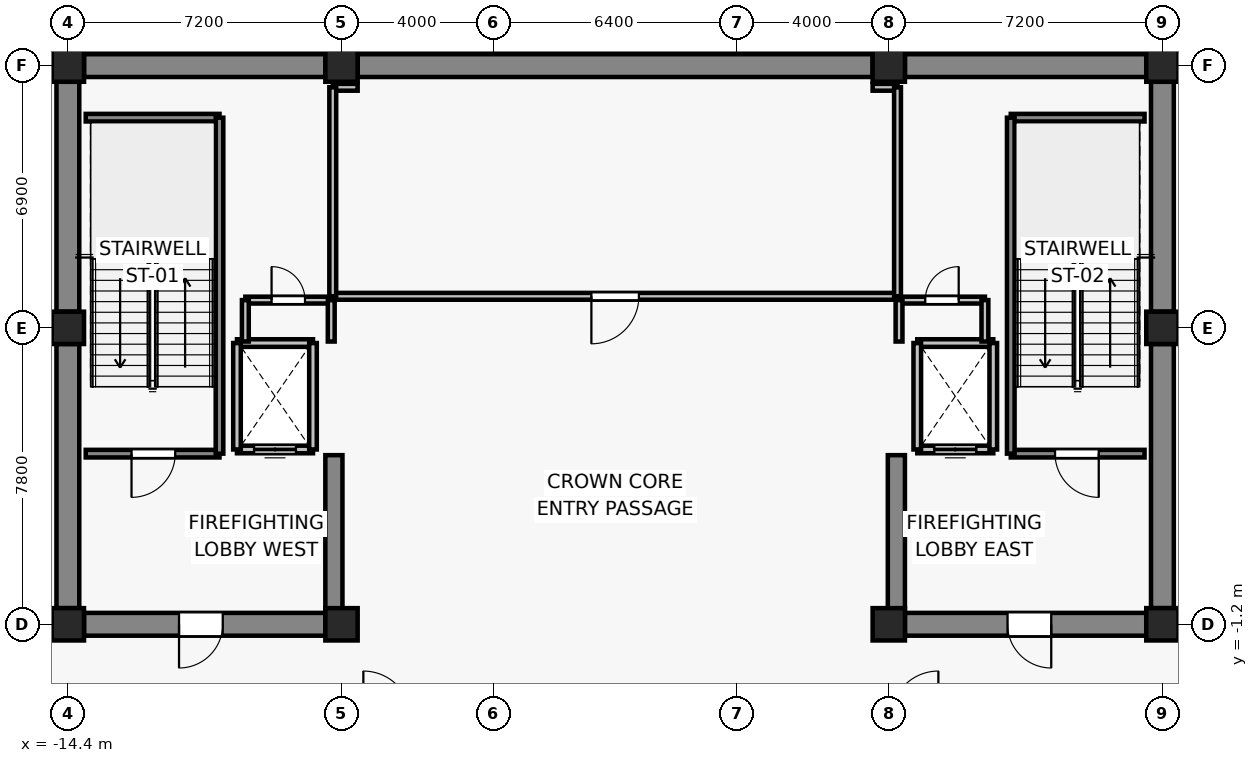
"""IFC4 building model, lengths in metres.
Left out: names, types, materials, properties, quantities, classifications, styles, units other than length and angle.
Written with IfcOpenShell. Run it as: python <this file> out.ifc"""

import sys

from ifc_helpers import new_model, si_unit, direction, frame, frame_2d, origin, origin_2d, place, context, subcontext, project, spatial, rectangle, extrude, source, transform, mapped, element, fill, save


model = new_model("IFC4")
c1 = context("Model", 3, precision=1e-05, world=origin(), true_north=direction((0.0, 1.0)))
c2 = subcontext(c1, "Body", "Model", "MODEL_VIEW")
j1 = project(units=[si_unit("LENGTHUNIT", "METRE"), si_unit("PLANEANGLEUNIT", "RADIAN")], contexts=[c1])
p1 = place(None, origin())
s1 = spatial("IfcSite", under=j1, at=p1, CompositionType="ELEMENT")
p2 = place(p1, origin())
s2 = spatial("IfcBuilding", under=s1, at=p2, CompositionType="ELEMENT")
p3 = place(p2, frame((0.0, 0.0, 285.4)))
s3 = spatial("IfcBuildingStorey", under=s2, at=p3, CompositionType="ELEMENT", Elevation=285.4)
for number, where, z_axis, x_axis in (
    (1, (-14.4, -1.2, 0.0), (0.0, 0.0, 1.0), (1.0, 0.0, 0.0)),
    (2, (-7.2, -1.2, 0.0), (0.0, 0.0, 1.0), (1.0, 0.0, 0.0)),
    (3, (7.2, -1.2, 0.0), (0.0, 0.0, 1.0), (1.0, 0.0, 0.0)),
    (4, (14.4, -1.2, 0.0), (0.0, 0.0, 1.0), (1.0, 0.0, 0.0)),
    (5, (-14.4, 6.6, 0.0), (0.0, 0.0, 1.0), (1.0, 0.0, 0.0)),
    (6, (14.4, 6.6, 0.0), (0.0, 0.0, 1.0), (1.0, 0.0, 0.0)),
    (7, (-14.4, 13.5, 0.0), (0.0, 0.0, 1.0), (1.0, 0.0, 0.0)),
    (8, (-7.2, 13.5, 0.0), (0.0, 0.0, 1.0), (1.0, 0.0, 0.0)),
    (9, (7.2, 13.5, 0.0), (0.0, 0.0, 1.0), (1.0, 0.0, 0.0)),
    (10, (14.4, 13.5, 0.0), (0.0, 0.0, 1.0), (1.0, 0.0, 0.0)),
):
    element("IfcColumn", number, at=place(p3, frame(where, z_axis=z_axis, x_axis=x_axis)), inside=s3, PredefinedType="COLUMN", context=c2, shape_type="SweptSolid", body=[
        extrude(rectangle(XDim=0.85, YDim=0.85, at=origin_2d()), origin(), (0.0, 0.0, 1.0), 4.6),
    ])
p4 = place(p3, frame((-13.975, 13.5, 0.0), z_axis=(0.0, 0.0, 1.0), x_axis=(1.0, 0.0, 0.0)))
e11 = element("IfcWall", 11, at=p4, inside=s3, PredefinedType="SHEAR", context=c2, shape_type="SweptSolid", body=[
    extrude(rectangle(XDim=6.35, YDim=0.6, at=frame_2d((3.175, 0.0))), origin(), (0.0, 0.0, 1.0), 4.38),
])
p5 = place(p3, frame((-6.775, 13.5, 0.0), z_axis=(0.0, 0.0, 1.0), x_axis=(1.0, 0.0, 0.0)))
e12 = element("IfcWall", 12, at=p5, inside=s3, PredefinedType="SHEAR", context=c2, shape_type="SweptSolid", body=[
    extrude(rectangle(XDim=13.55, YDim=0.6, at=frame_2d((6.775, 0.0))), origin(), (0.0, 0.0, 1.0), 4.38),
])
p6 = place(p3, frame((7.625, 13.5, 0.0), z_axis=(0.0, 0.0, 1.0), x_axis=(1.0, 0.0, 0.0)))
e13 = element("IfcWall", 13, at=p6, inside=s3, PredefinedType="SHEAR", context=c2, shape_type="SweptSolid", body=[
    extrude(rectangle(XDim=6.35, YDim=0.6, at=frame_2d((3.175, 0.0))), origin(), (0.0, 0.0, 1.0), 4.38),
])
p7 = place(p3, frame((-14.4, -0.775, 0.0), z_axis=(0.0, 0.0, 1.0), x_axis=(0.0, 1.0, 0.0)))
e14 = element("IfcWall", 14, at=p7, inside=s3, PredefinedType="SHEAR", context=c2, shape_type="SweptSolid", body=[
    extrude(rectangle(XDim=6.95, YDim=0.6, at=frame_2d((3.475, 0.0))), origin(), (0.0, 0.0, 1.0), 4.38),
])
p8 = place(p3, frame((-14.4, 7.025, 0.0), z_axis=(0.0, 0.0, 1.0), x_axis=(0.0, 1.0, 0.0)))
e15 = element("IfcWall", 15, at=p8, inside=s3, PredefinedType="SHEAR", context=c2, shape_type="SweptSolid", body=[
    extrude(rectangle(XDim=6.05, YDim=0.6, at=frame_2d((3.025, 0.0))), origin(), (0.0, 0.0, 1.0), 4.38),
])
p9 = place(p3, frame((14.4, -0.775, 0.0), z_axis=(0.0, 0.0, 1.0), x_axis=(0.0, 1.0, 0.0)))
e16 = element("IfcWall", 16, at=p9, inside=s3, PredefinedType="SHEAR", context=c2, shape_type="SweptSolid", body=[
    extrude(rectangle(XDim=6.95, YDim=0.6, at=frame_2d((3.475, 0.0))), origin(), (0.0, 0.0, 1.0), 4.38),
])
p10 = place(p3, frame((14.4, 7.025, 0.0), z_axis=(0.0, 0.0, 1.0), x_axis=(0.0, 1.0, 0.0)))
e17 = element("IfcWall", 17, at=p10, inside=s3, PredefinedType="SHEAR", context=c2, shape_type="SweptSolid", body=[
    extrude(rectangle(XDim=6.05, YDim=0.6, at=frame_2d((3.025, 0.0))), origin(), (0.0, 0.0, 1.0), 4.38),
])
p11 = place(p3, frame((-7.625, -1.2, 0.0), z_axis=(0.0, 0.0, 1.0), x_axis=(-1.0, 0.0, 0.0)))
e18 = element("IfcWall", 18, at=p11, inside=s3, PredefinedType="SHEAR", context=c2, shape_type="SweptSolid", body=[
    extrude(rectangle(XDim=6.35, YDim=0.6, at=frame_2d((3.175, 0.0))), origin(), (0.0, 0.0, 1.0), 4.38),
])
p12 = place(p11, frame((2.7, 0.0, 0.0)))
e19 = element("IfcOpeningElement", 19, at=p12, cuts=e18, PredefinedType="OPENING", context=c2, shape_type="SweptSolid", body=[
    extrude(rectangle(XDim=1.15, YDim=2.15, at=frame_2d((0.575, 1.075))), frame((0.0, 0.31, 0.0), z_axis=(0.0, -1.0, 0.0), x_axis=(1.0, 0.0, 0.0)), (0.0, 0.0, 1.0), 0.62),
])
p13 = place(p3, frame((13.975, -1.2, 0.0), z_axis=(0.0, 0.0, 1.0), x_axis=(-1.0, 0.0, 0.0)))
e20 = element("IfcWall", 20, at=p13, inside=s3, PredefinedType="SHEAR", context=c2, shape_type="SweptSolid", body=[
    extrude(rectangle(XDim=6.35, YDim=0.6, at=frame_2d((3.175, 0.0))), origin(), (0.0, 0.0, 1.0), 4.38),
])
p14 = place(p13, frame((2.5, 0.0, 0.0)))
e21 = element("IfcOpeningElement", 21, at=p14, cuts=e20, PredefinedType="OPENING", context=c2, shape_type="SweptSolid", body=[
    extrude(rectangle(XDim=1.15, YDim=2.15, at=frame_2d((0.575, 1.075))), frame((0.0, 0.31, 0.0), z_axis=(0.0, -1.0, 0.0), x_axis=(1.0, 0.0, 0.0)), (0.0, 0.0, 1.0), 0.62),
])
for number, where, z_axis, x_axis in (
    (22, (-7.4, -0.9, 0.0), (0.0, 0.0, 1.0), (0.0, 1.0, 0.0)),
    (23, (7.4, -0.9, 0.0), (0.0, 0.0, 1.0), (0.0, 1.0, 0.0)),
):
    element("IfcWall", number, at=place(p3, frame(where, z_axis=z_axis, x_axis=x_axis)), inside=s3, PredefinedType="SHEAR", context=c2, shape_type="SweptSolid", body=[
        extrude(rectangle(XDim=4.15, YDim=0.45, at=frame_2d((2.075, 0.0))), origin(), (0.0, 0.0, 1.0), 4.38),
    ])
p15 = place(p3, frame((-7.95, 3.4, 0.0), z_axis=(0.0, 0.0, 1.0), x_axis=(-1.0, 0.0, 0.0)))
e24 = element("IfcWall", 24, at=p15, inside=s3, PredefinedType="SOLIDWALL", context=c2, shape_type="SweptSolid", body=[
    extrude(rectangle(XDim=2.0, YDim=0.2, at=frame_2d((1.0, 0.0))), origin(), (0.0, 0.0, 1.0), 4.38),
])
p16 = place(p15, frame((0.45, 0.0, 0.0)))
e25 = element("IfcOpeningElement", 25, at=p16, cuts=e24, PredefinedType="OPENING", context=c2, shape_type="SweptSolid", body=[
    extrude(rectangle(XDim=1.1, YDim=2.2, at=frame_2d((0.55, 1.1))), frame((0.0, 0.11, 0.0), z_axis=(0.0, -1.0, 0.0), x_axis=(1.0, 0.0, 0.0)), (0.0, 0.0, 1.0), 0.22),
])
p17 = place(p3, frame((-9.95, 6.2, 0.0), z_axis=(0.0, 0.0, 1.0), x_axis=(1.0, 0.0, 0.0)))
e26 = element("IfcWall", 26, at=p17, inside=s3, PredefinedType="SOLIDWALL", context=c2, shape_type="SweptSolid", body=[
    extrude(rectangle(XDim=2.0, YDim=0.2, at=frame_2d((1.0, 0.0))), origin(), (0.0, 0.0, 1.0), 4.38),
])
for number, where, z_axis, x_axis in (
    (27, (-9.95, 3.4, 0.0), (0.0, 0.0, 1.0), (0.0, 1.0, 0.0)),
    (28, (-7.95, 6.2, 0.0), (0.0, 0.0, 1.0), (0.0, -1.0, 0.0)),
):
    element("IfcWall", number, at=place(p3, frame(where, z_axis=z_axis, x_axis=x_axis)), inside=s3, PredefinedType="SOLIDWALL", context=c2, shape_type="SweptSolid", body=[
        extrude(rectangle(XDim=2.8, YDim=0.2, at=frame_2d((1.4, 0.0))), origin(), (0.0, 0.0, 1.0), 4.38),
    ])
p18 = place(p3, frame((9.95, 3.4, 0.0), z_axis=(0.0, 0.0, 1.0), x_axis=(-1.0, 0.0, 0.0)))
e29 = element("IfcWall", 29, at=p18, inside=s3, PredefinedType="SOLIDWALL", context=c2, shape_type="SweptSolid", body=[
    extrude(rectangle(XDim=2.0, YDim=0.2, at=frame_2d((1.0, 0.0))), origin(), (0.0, 0.0, 1.0), 4.38),
])
p19 = place(p18, frame((0.45, 0.0, 0.0)))
e30 = element("IfcOpeningElement", 30, at=p19, cuts=e29, PredefinedType="OPENING", context=c2, shape_type="SweptSolid", body=[
    extrude(rectangle(XDim=1.1, YDim=2.2, at=frame_2d((0.55, 1.1))), frame((0.0, 0.11, 0.0), z_axis=(0.0, -1.0, 0.0), x_axis=(1.0, 0.0, 0.0)), (0.0, 0.0, 1.0), 0.22),
])
p20 = place(p3, frame((7.95, 6.2, 0.0), z_axis=(0.0, 0.0, 1.0), x_axis=(1.0, 0.0, 0.0)))
e31 = element("IfcWall", 31, at=p20, inside=s3, PredefinedType="SOLIDWALL", context=c2, shape_type="SweptSolid", body=[
    extrude(rectangle(XDim=2.0, YDim=0.2, at=frame_2d((1.0, 0.0))), origin(), (0.0, 0.0, 1.0), 4.38),
])
for number, where, z_axis, x_axis in (
    (32, (7.95, 3.4, 0.0), (0.0, 0.0, 1.0), (0.0, 1.0, 0.0)),
    (33, (9.95, 6.2, 0.0), (0.0, 0.0, 1.0), (0.0, -1.0, 0.0)),
):
    element("IfcWall", number, at=place(p3, frame(where, z_axis=z_axis, x_axis=x_axis)), inside=s3, PredefinedType="SOLIDWALL", context=c2, shape_type="SweptSolid", body=[
        extrude(rectangle(XDim=2.8, YDim=0.2, at=frame_2d((1.4, 0.0))), origin(), (0.0, 0.0, 1.0), 4.38),
    ])
p21 = place(p3, frame((-10.41, 3.29, 0.0), z_axis=(0.0, 0.0, 1.0), x_axis=(-1.0, 0.0, 0.0)))
e34 = element("IfcWall", 34, at=p21, inside=s3, PredefinedType="SOLIDWALL", context=c2, shape_type="SweptSolid", body=[
    extrude(rectangle(XDim=3.52, YDim=0.2, at=frame_2d((1.76, 0.0))), origin(), (0.0, 0.0, 1.0), 4.38),
])
p22 = place(p21, frame((1.165, 0.0, 0.0)))
e35 = element("IfcOpeningElement", 35, at=p22, cuts=e34, PredefinedType="OPENING", context=c2, shape_type="SweptSolid", body=[
    extrude(rectangle(XDim=1.15, YDim=2.15, at=frame_2d((0.575, 1.075))), frame((0.0, 0.11, 0.0), z_axis=(0.0, -1.0, 0.0), x_axis=(1.0, 0.0, 0.0)), (0.0, 0.0, 1.0), 0.22),
])
p23 = place(p3, frame((-13.93, 12.13, 0.0), z_axis=(0.0, 0.0, 1.0), x_axis=(1.0, 0.0, 0.0)))
e36 = element("IfcWall", 36, at=p23, inside=s3, PredefinedType="SOLIDWALL", context=c2, shape_type="SweptSolid", body=[
    extrude(rectangle(XDim=3.52, YDim=0.2, at=frame_2d((1.76, 0.0))), origin(), (0.0, 0.0, 1.0), 4.38),
])
p24 = place(p3, frame((-10.41, 12.13, 0.0), z_axis=(0.0, 0.0, 1.0), x_axis=(0.0, -1.0, 0.0)))
e37 = element("IfcWall", 37, at=p24, inside=s3, PredefinedType="SOLIDWALL", context=c2, shape_type="SweptSolid", body=[
    extrude(rectangle(XDim=8.84, YDim=0.2, at=frame_2d((4.42, 0.0))), origin(), (0.0, 0.0, 1.0), 4.38),
])
p25 = place(p3, frame((13.93, 3.29, 0.0), z_axis=(0.0, 0.0, 1.0), x_axis=(-1.0, 0.0, 0.0)))
e38 = element("IfcWall", 38, at=p25, inside=s3, PredefinedType="SOLIDWALL", context=c2, shape_type="SweptSolid", body=[
    extrude(rectangle(XDim=3.52, YDim=0.2, at=frame_2d((1.76, 0.0))), origin(), (0.0, 0.0, 1.0), 4.38),
])
p26 = place(p25, frame((1.205, 0.0, 0.0)))
e39 = element("IfcOpeningElement", 39, at=p26, cuts=e38, PredefinedType="OPENING", context=c2, shape_type="SweptSolid", body=[
    extrude(rectangle(XDim=1.15, YDim=2.15, at=frame_2d((0.575, 1.075))), frame((0.0, 0.11, 0.0), z_axis=(0.0, -1.0, 0.0), x_axis=(1.0, 0.0, 0.0)), (0.0, 0.0, 1.0), 0.22),
])
p27 = place(p3, frame((10.41, 12.13, 0.0), z_axis=(0.0, 0.0, 1.0), x_axis=(1.0, 0.0, 0.0)))
e40 = element("IfcWall", 40, at=p27, inside=s3, PredefinedType="SOLIDWALL", context=c2, shape_type="SweptSolid", body=[
    extrude(rectangle(XDim=3.52, YDim=0.2, at=frame_2d((1.76, 0.0))), origin(), (0.0, 0.0, 1.0), 4.38),
])
p28 = place(p3, frame((10.41, 3.29, 0.0), z_axis=(0.0, 0.0, 1.0), x_axis=(0.0, 1.0, 0.0)))
e41 = element("IfcWall", 41, at=p28, inside=s3, PredefinedType="SOLIDWALL", context=c2, shape_type="SweptSolid", body=[
    extrude(rectangle(XDim=8.84, YDim=0.2, at=frame_2d((4.42, 0.0))), origin(), (0.0, 0.0, 1.0), 4.38),
])
p29 = place(p3, frame((7.43, 7.43, 0.0), z_axis=(0.0, 0.0, 1.0), x_axis=(-1.0, 0.0, 0.0)))
e42 = element("IfcWall", 42, at=p29, inside=s3, PredefinedType="PARTITIONING", context=c2, shape_type="SweptSolid", body=[
    extrude(rectangle(XDim=14.86, YDim=0.18, at=frame_2d((7.43, 0.0))), origin(), (0.0, 0.0, 1.0), 3.77),
])
p30 = place(p29, frame((6.805, 0.0, 0.0)))
e43 = element("IfcOpeningElement", 43, at=p30, cuts=e42, PredefinedType="OPENING", context=c2, shape_type="SweptSolid", body=[
    extrude(rectangle(XDim=1.25, YDim=2.15, at=frame_2d((0.625, 1.075))), frame((0.0, 0.1, 0.0), z_axis=(0.0, -1.0, 0.0), x_axis=(1.0, 0.0, 0.0)), (0.0, 0.0, 1.0), 0.2),
])
for number, where, z_axis, x_axis in (
    (44, (-7.43, 12.93, 0.0), (0.0, 0.0, 1.0), (1.0, 0.0, 0.0)),
    (45, (6.775, 12.93, 0.0), (0.0, 0.0, 1.0), (1.0, 0.0, 0.0)),
):
    element("IfcWall", number, at=place(p3, frame(where, z_axis=z_axis, x_axis=x_axis)), inside=s3, PredefinedType="PARTITIONING", context=c2, shape_type="SweptSolid", body=[
        extrude(rectangle(XDim=0.655, YDim=0.18, at=frame_2d((0.328, 0.0))), origin(), (0.0, 0.0, 1.0), 3.77),
    ])
for number, where, z_axis, x_axis in (
    (46, (-7.43, 7.43, 0.0), (0.0, 0.0, 1.0), (0.0, 1.0, 0.0)),
    (47, (7.43, 12.93, 0.0), (0.0, 0.0, 1.0), (0.0, -1.0, 0.0)),
):
    element("IfcWall", number, at=place(p3, frame(where, z_axis=z_axis, x_axis=x_axis)), inside=s3, PredefinedType="PARTITIONING", context=c2, shape_type="SweptSolid", body=[
        extrude(rectangle(XDim=5.5, YDim=0.18, at=frame_2d((2.75, 0.0))), origin(), (0.0, 0.0, 1.0), 3.77),
    ])
p31 = place(p3, frame((-9.73, 7.33, 0.0), z_axis=(0.0, 0.0, 1.0), x_axis=(1.0, 0.0, 0.0)))
e48 = element("IfcWall", 48, at=p31, inside=s3, PredefinedType="PARTITIONING", context=c2, shape_type="SweptSolid", body=[
    extrude(rectangle(XDim=2.26, YDim=0.18, at=frame_2d((1.13, 0.0))), origin(), (0.0, 0.0, 1.0), 3.77),
])
p32 = place(p31, frame((0.69, 0.0, 0.0)))
e49 = element("IfcOpeningElement", 49, at=p32, cuts=e48, PredefinedType="OPENING", context=c2, shape_type="SweptSolid", body=[
    extrude(rectangle(XDim=0.88, YDim=2.1, at=frame_2d((0.44, 1.05))), frame((0.0, 0.1, 0.0), z_axis=(0.0, -1.0, 0.0), x_axis=(1.0, 0.0, 0.0)), (0.0, 0.0, 1.0), 0.2),
])
p33 = place(p3, frame((-9.73, 6.24, 0.0), z_axis=(0.0, 0.0, 1.0), x_axis=(0.0, 1.0, 0.0)))
e50 = element("IfcWall", 50, at=p33, inside=s3, PredefinedType="PARTITIONING", context=c2, shape_type="SweptSolid", body=[
    extrude(rectangle(XDim=1.09, YDim=0.18, at=frame_2d((0.545, 0.0))), origin(), (0.0, 0.0, 1.0), 4.38),
])
p34 = place(p3, frame((-7.47, 7.33, 0.0), z_axis=(0.0, 0.0, 1.0), x_axis=(0.0, -1.0, 0.0)))
e51 = element("IfcWall", 51, at=p34, inside=s3, PredefinedType="PARTITIONING", context=c2, shape_type="SweptSolid", body=[
    extrude(rectangle(XDim=1.09, YDim=0.18, at=frame_2d((0.545, 0.0))), origin(), (0.0, 0.0, 1.0), 3.77),
])
p35 = place(p3, frame((7.47, 7.33, 0.0), z_axis=(0.0, 0.0, 1.0), x_axis=(1.0, 0.0, 0.0)))
e52 = element("IfcWall", 52, at=p35, inside=s3, PredefinedType="PARTITIONING", context=c2, shape_type="SweptSolid", body=[
    extrude(rectangle(XDim=2.26, YDim=0.18, at=frame_2d((1.13, 0.0))), origin(), (0.0, 0.0, 1.0), 3.77),
])
p36 = place(p35, frame((0.69, 0.0, 0.0)))
e53 = element("IfcOpeningElement", 53, at=p36, cuts=e52, PredefinedType="OPENING", context=c2, shape_type="SweptSolid", body=[
    extrude(rectangle(XDim=0.88, YDim=2.1, at=frame_2d((0.44, 1.05))), frame((0.0, 0.1, 0.0), z_axis=(0.0, -1.0, 0.0), x_axis=(1.0, 0.0, 0.0)), (0.0, 0.0, 1.0), 0.2),
])
p37 = place(p3, frame((7.47, 6.24, 0.0), z_axis=(0.0, 0.0, 1.0), x_axis=(0.0, 1.0, 0.0)))
e54 = element("IfcWall", 54, at=p37, inside=s3, PredefinedType="PARTITIONING", context=c2, shape_type="SweptSolid", body=[
    extrude(rectangle(XDim=1.09, YDim=0.18, at=frame_2d((0.545, 0.0))), origin(), (0.0, 0.0, 1.0), 3.77),
])
p38 = place(p3, frame((9.73, 7.33, 0.0), z_axis=(0.0, 0.0, 1.0), x_axis=(0.0, -1.0, 0.0)))
e55 = element("IfcWall", 55, at=p38, inside=s3, PredefinedType="PARTITIONING", context=c2, shape_type="SweptSolid", body=[
    extrude(rectangle(XDim=1.09, YDim=0.18, at=frame_2d((0.545, 0.0))), origin(), (0.0, 0.0, 1.0), 4.38),
])
m1 = source(origin(), c2, "Body", "SweptSolid", [
    extrude(rectangle(XDim=1.1, YDim=2.2, at=frame_2d((0.55, 1.1))), frame((0.0, 0.025, 0.0), z_axis=(0.0, -1.0, 0.0), x_axis=(1.0, 0.0, 0.0)), (0.0, 0.0, 1.0), 0.05),
])
p39 = place(p16, origin())
e56 = element("IfcDoor", 56, at=p39, inside=s3, OperationType="DOUBLE_DOOR_SLIDING", PredefinedType="DOOR", context=c2, shape_type="MappedRepresentation", body=[
    mapped(m1, transform((0.0, 0.0, 0.0), x_axis=(1.0, 0.0, 0.0), y_axis=(0.0, 1.0, 0.0), z_axis=(0.0, 0.0, 1.0), scale=1.0)),
])
fill(e25, e56)
p40 = place(p19, origin())
e57 = element("IfcDoor", 57, at=p40, inside=s3, OperationType="DOUBLE_DOOR_SLIDING", PredefinedType="DOOR", context=c2, shape_type="MappedRepresentation", body=[
    mapped(m1, transform((0.0, 0.0, 0.0), x_axis=(1.0, 0.0, 0.0), y_axis=(0.0, 1.0, 0.0), z_axis=(0.0, 0.0, 1.0), scale=1.0)),
])
fill(e30, e57)
m2 = source(origin(), c2, "Body", "SweptSolid", [
    extrude(rectangle(XDim=1.15, YDim=2.15, at=frame_2d((0.575, 1.075))), frame((0.0, 0.025, 0.0), z_axis=(0.0, -1.0, 0.0), x_axis=(1.0, 0.0, 0.0)), (0.0, 0.0, 1.0), 0.05),
])
p41 = place(p22, origin())
e58 = element("IfcDoor", 58, at=p41, inside=s3, OperationType="SINGLE_SWING_RIGHT", PredefinedType="DOOR", context=c2, shape_type="MappedRepresentation", body=[
    mapped(m2, transform((0.0, 0.0, 0.0), x_axis=(1.0, 0.0, 0.0), y_axis=(0.0, 1.0, 0.0), z_axis=(0.0, 0.0, 1.0), scale=1.0)),
])
fill(e35, e58)
p42 = place(p26, origin())
e59 = element("IfcDoor", 59, at=p42, inside=s3, OperationType="SINGLE_SWING_LEFT", PredefinedType="DOOR", context=c2, shape_type="MappedRepresentation", body=[
    mapped(m2, transform((0.0, 0.0, 0.0), x_axis=(1.0, 0.0, 0.0), y_axis=(0.0, 1.0, 0.0), z_axis=(0.0, 0.0, 1.0), scale=1.0)),
])
fill(e39, e59)
p43 = place(p12, origin())
e60 = element("IfcDoor", 60, at=p43, inside=s3, OperationType="SINGLE_SWING_RIGHT", PredefinedType="DOOR", context=c2, shape_type="MappedRepresentation", body=[
    mapped(m2, transform((0.0, 0.0, 0.0), x_axis=(1.0, 0.0, 0.0), y_axis=(0.0, 1.0, 0.0), z_axis=(0.0, 0.0, 1.0), scale=1.0)),
])
fill(e19, e60)
p44 = place(p14, origin())
e61 = element("IfcDoor", 61, at=p44, inside=s3, OperationType="SINGLE_SWING_LEFT", PredefinedType="DOOR", context=c2, shape_type="MappedRepresentation", body=[
    mapped(m2, transform((0.0, 0.0, 0.0), x_axis=(1.0, 0.0, 0.0), y_axis=(0.0, 1.0, 0.0), z_axis=(0.0, 0.0, 1.0), scale=1.0)),
])
fill(e21, e61)
m3 = source(origin(), c2, "Body", "SweptSolid", [
    extrude(rectangle(XDim=1.25, YDim=2.15, at=frame_2d((0.625, 1.075))), frame((0.0, 0.025, 0.0), z_axis=(0.0, -1.0, 0.0), x_axis=(1.0, 0.0, 0.0)), (0.0, 0.0, 1.0), 0.05),
])
p45 = place(p30, origin())
e62 = element("IfcDoor", 62, at=p45, inside=s3, OperationType="SINGLE_SWING_RIGHT", PredefinedType="DOOR", context=c2, shape_type="MappedRepresentation", body=[
    mapped(m3, transform((0.0, 0.0, 0.0), x_axis=(1.0, 0.0, 0.0), y_axis=(0.0, 1.0, 0.0), z_axis=(0.0, 0.0, 1.0), scale=1.0)),
])
fill(e43, e62)
m4 = source(origin(), c2, "Body", "SweptSolid", [
    extrude(rectangle(XDim=0.88, YDim=2.1, at=frame_2d((0.44, 1.05))), frame((0.0, 0.025, 0.0), z_axis=(0.0, -1.0, 0.0), x_axis=(1.0, 0.0, 0.0)), (0.0, 0.0, 1.0), 0.05),
])
p46 = place(p32, origin())
e63 = element("IfcDoor", 63, at=p46, inside=s3, OperationType="SINGLE_SWING_LEFT", PredefinedType="DOOR", context=c2, shape_type="MappedRepresentation", body=[
    mapped(m4, transform((0.0, 0.0, 0.0), x_axis=(1.0, 0.0, 0.0), y_axis=(0.0, 1.0, 0.0), z_axis=(0.0, 0.0, 1.0), scale=1.0)),
])
fill(e49, e63)
p47 = place(p36, origin())
e64 = element("IfcDoor", 64, at=p47, inside=s3, OperationType="SINGLE_SWING_RIGHT", PredefinedType="DOOR", context=c2, shape_type="MappedRepresentation", body=[
    mapped(m4, transform((0.0, 0.0, 0.0), x_axis=(1.0, 0.0, 0.0), y_axis=(0.0, 1.0, 0.0), z_axis=(0.0, 0.0, 1.0), scale=1.0)),
])
fill(e53, e64)
save(model, sys.argv[1])
